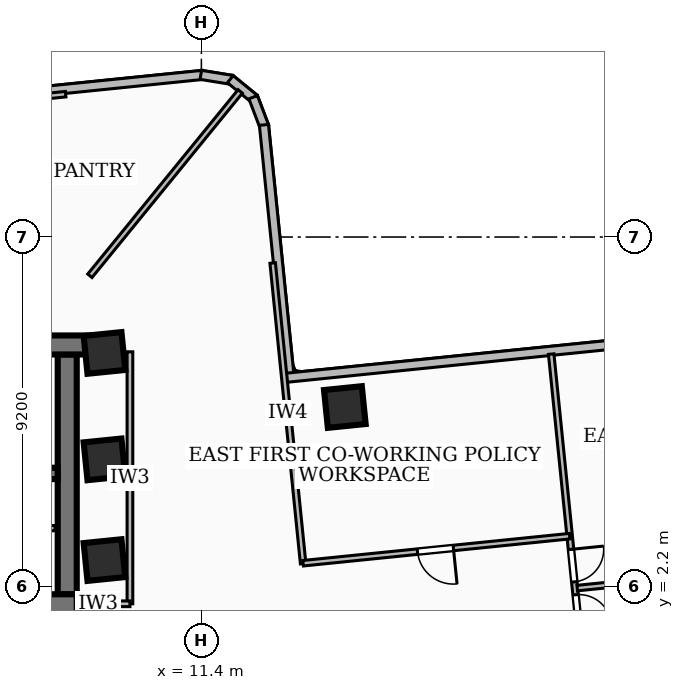
"""IFC4 building model, lengths in metres.
Left out: names, types, materials, properties, quantities, classifications, styles, units other than length and angle.
Written with IfcOpenShell. Run it as: python <this file> out.ifc"""

import sys

from ifc_helpers import new_model, si_unit, direction, frame, frame_2d, origin, origin_2d, place, context, subcontext, project, spatial, rectangle, extrude, element, fill, save


model = new_model("IFC4")
c1 = context("Model", 3, precision=1e-05, world=origin(), true_north=direction((0.0, 1.0)))
c2 = subcontext(c1, "Body", "Model", "MODEL_VIEW")
j1 = project(units=[si_unit("LENGTHUNIT", "METRE"), si_unit("PLANEANGLEUNIT", "RADIAN")], contexts=[c1])
p1 = place(None, origin())
s1 = spatial("IfcSite", under=j1, at=p1, CompositionType="ELEMENT")
p2 = place(p1, origin())
s2 = spatial("IfcBuilding", under=s1, at=p2, CompositionType="ELEMENT")
p3 = place(p2, frame((0.0, 0.0, 67.68)))
s3 = spatial("IfcBuildingStorey", under=s2, at=p3, CompositionType="ELEMENT", Elevation=67.68)
p4 = place(p3, frame((-8.78, 8.56, 0.0), z_axis=(0.0, 0.0, 1.0), x_axis=(1.0, 0.0, 0.0)))
e1 = element("IfcWall", 1, at=p4, inside=s3, PredefinedType="SHEAR", context=c2, shape_type="SweptSolid", body=[
    extrude(rectangle(XDim=17.56, YDim=0.5, at=frame_2d((8.78, 0.0))), origin(), (0.0, 0.0, 1.0), 3.34),
])
p5 = place(p3, frame((8.12, 1.75, 0.0), z_axis=(0.0, 0.0, 1.0), x_axis=(-1.0, 0.0, 0.0)))
e2 = element("IfcWall", 2, at=p5, inside=s3, PredefinedType="SHEAR", context=c2, shape_type="SweptSolid", body=[
    extrude(rectangle(XDim=16.24, YDim=0.5, at=frame_2d((8.12, 0.0))), origin(), (0.0, 0.0, 1.0), 3.34),
])
p6 = place(p5, frame((7.45, 0.0, 0.0)))
e3 = element("IfcOpeningElement", 3, at=p6, cuts=e2, PredefinedType="OPENING", context=c2, shape_type="SweptSolid", body=[
    extrude(rectangle(XDim=1.0, YDim=2.1, at=frame_2d((0.5, 1.05))), frame((0.0, 0.26, 0.0), z_axis=(0.0, -1.0, 0.0), x_axis=(1.0, 0.0, 0.0)), (0.0, 0.0, 1.0), 0.52),
])
p7 = place(p5, frame((3.4, 0.0, 0.0)))
e4 = element("IfcOpeningElement", 4, at=p7, cuts=e2, PredefinedType="OPENING", context=c2, shape_type="SweptSolid", body=[
    extrude(rectangle(XDim=0.9, YDim=2.06, at=frame_2d((0.45, 1.03))), frame((0.0, 0.26, 0.0), z_axis=(0.0, -1.0, 0.0), x_axis=(1.0, 0.0, 0.0)), (0.0, 0.0, 1.0), 0.52),
])
p8 = place(p5, frame((1.1, 0.0, 0.0)))
e5 = element("IfcOpeningElement", 5, at=p8, cuts=e2, PredefinedType="OPENING", context=c2, shape_type="SweptSolid", body=[
    extrude(rectangle(XDim=0.9, YDim=2.06, at=frame_2d((0.45, 1.03))), frame((0.0, 0.26, 0.0), z_axis=(0.0, -1.0, 0.0), x_axis=(1.0, 0.0, 0.0)), (0.0, 0.0, 1.0), 0.52),
])
p9 = place(p3, frame((7.87, 8.31, 0.0), z_axis=(0.0, 0.0, 1.0), x_axis=(0.0, -1.0, 0.0)))
e6 = element("IfcWall", 6, at=p9, inside=s3, PredefinedType="SHEAR", context=c2, shape_type="SweptSolid", body=[
    extrude(rectangle(XDim=6.31, YDim=0.5, at=frame_2d((3.155, 0.0))), origin(), (0.0, 0.0, 1.0), 3.34),
])
p10 = place(p3, frame((7.62, 5.18, 0.0), z_axis=(0.0, 0.0, 1.0), x_axis=(-1.0, 0.0, 0.0)))
e7 = element("IfcWall", 7, at=p10, inside=s3, PredefinedType="SOLIDWALL", context=c2, shape_type="SweptSolid", body=[
    extrude(rectangle(XDim=15.24, YDim=0.3, at=frame_2d((7.62, 0.0))), origin(), (0.0, 0.0, 1.0), 3.34),
])
p11 = place(p10, frame((5.77, 0.0, 0.0)))
e8 = element("IfcOpeningElement", 8, at=p11, cuts=e7, PredefinedType="OPENING", context=c2, shape_type="SweptSolid", body=[
    extrude(rectangle(XDim=1.1, YDim=2.15, at=frame_2d((0.55, 1.075))), frame((0.0, 0.16, 0.0), z_axis=(0.0, -1.0, 0.0), x_axis=(1.0, 0.0, 0.0)), (0.0, 0.0, 1.0), 0.32),
])
p12 = place(p10, frame((2.97, 0.0, 0.0)))
e9 = element("IfcOpeningElement", 9, at=p12, cuts=e7, PredefinedType="OPENING", context=c2, shape_type="SweptSolid", body=[
    extrude(rectangle(XDim=1.1, YDim=2.15, at=frame_2d((0.55, 1.075))), frame((0.0, 0.16, 0.0), z_axis=(0.0, -1.0, 0.0), x_axis=(1.0, 0.0, 0.0)), (0.0, 0.0, 1.0), 0.32),
])
p13 = place(p10, frame((7.97, 0.0, 0.0)))
e10 = element("IfcOpeningElement", 10, at=p13, cuts=e7, PredefinedType="OPENING", context=c2, shape_type="SweptSolid", body=[
    extrude(rectangle(XDim=1.0, YDim=2.1, at=frame_2d((0.5, 1.05))), frame((0.0, 0.16, 0.0), z_axis=(0.0, -1.0, 0.0), x_axis=(1.0, 0.0, 0.0)), (0.0, 0.0, 1.0), 0.32),
])
for number, where, z_axis, x_axis in (
    (11, (8.85, 2.9, 0.0), (0.0, 0.0, 1.0), (0.995, 0.101, 0.0)),
    (12, (8.85, 5.55, 0.0), (0.0, 0.0, 1.0), (0.995, 0.101, 0.0)),
    (13, (8.85, 8.35, 0.0), (0.0, 0.0, 1.0), (0.995, 0.101, 0.0)),
    (14, (15.175, 6.927, 0.0), (0.0, 0.0, 1.0), (0.995, 0.101, 0.0)),
):
    element("IfcColumn", number, at=place(p3, frame(where, z_axis=z_axis, x_axis=x_axis)), inside=s3, PredefinedType="COLUMN", context=c2, shape_type="SweptSolid", body=[
        extrude(rectangle(XDim=1.0, YDim=1.0, at=origin_2d()), origin(), (0.0, 0.0, 1.0), 3.6),
    ])
p14 = place(p3, frame((4.694, 14.981, 0.0), z_axis=(0.0, 0.0, 1.0), x_axis=(0.994875719665, 0.101105402534, 0.0)))
e15 = element("IfcWall", 15, at=p14, inside=s3, PredefinedType="SOLIDWALL", context=c2, shape_type="SweptSolid", body=[
    extrude(rectangle(XDim=6.776, YDim=0.24, at=frame_2d((3.388, 0.0))), origin(), (0.0, 0.0, 1.0), 2.486),
])
p15 = place(p3, frame((11.385, 15.667, 0.0), z_axis=(0.0, 0.0, 1.0), x_axis=(0.987091669755, -0.160156284613, 0.0)))
e16 = element("IfcWall", 16, at=p15, inside=s3, PredefinedType="SOLIDWALL", context=c2, shape_type="SweptSolid", body=[
    extrude(rectangle(XDim=0.831, YDim=0.24, at=frame_2d((0.416, 0.0))), origin(), (0.0, 0.0, 1.0), 3.34),
])
p16 = place(p3, frame((12.161, 15.554, 0.0), z_axis=(0.0, 0.0, 1.0), x_axis=(0.774946287969, -0.632027096542, 0.0)))
e17 = element("IfcWall", 17, at=p16, inside=s3, PredefinedType="SOLIDWALL", context=c2, shape_type="SweptSolid", body=[
    extrude(rectangle(XDim=0.813, YDim=0.24, at=frame_2d((0.407, 0.0))), origin(), (0.0, 0.0, 1.0), 3.34),
])
p17 = place(p3, frame((12.763, 15.079, 0.0), z_axis=(0.0, 0.0, 1.0), x_axis=(0.355469529522, -0.934687869602, 0.0)))
e18 = element("IfcWall", 18, at=p17, inside=s3, PredefinedType="SOLIDWALL", context=c2, shape_type="SweptSolid", body=[
    extrude(rectangle(XDim=0.83, YDim=0.24, at=frame_2d((0.415, 0.0))), origin(), (0.0, 0.0, 1.0), 3.34),
])
p18 = place(p3, frame((13.046, 14.351, 0.0), z_axis=(0.0, 0.0, 1.0), x_axis=(0.101248053545, -0.994861212257, 0.0)))
e19 = element("IfcWall", 19, at=p18, inside=s3, PredefinedType="SOLIDWALL", context=c2, shape_type="SweptSolid", body=[
    extrude(rectangle(XDim=6.776, YDim=0.24, at=frame_2d((3.388, 0.0))), origin(), (0.0, 0.0, 1.0), 3.34),
])
p19 = place(p3, frame((13.626, 7.696, 0.0), z_axis=(0.0, 0.0, 1.0), x_axis=(0.994872930989, 0.101132839298, 0.0)))
e20 = element("IfcWall", 20, at=p19, inside=s3, PredefinedType="SOLIDWALL", context=c2, shape_type="SweptSolid", body=[
    extrude(rectangle(XDim=16.276, YDim=0.24, at=frame_2d((8.138, 0.0))), origin(), (0.0, 0.0, 1.0), 3.34),
])
p20 = place(p19, frame((13.675, 0.0, 0.85)))
e21 = element("IfcOpeningElement", 21, at=p20, cuts=e20, PredefinedType="OPENING", context=c2, shape_type="SweptSolid", body=[
    extrude(rectangle(XDim=1.5, YDim=1.8, at=frame_2d((0.75, 0.9))), frame((0.0, 0.13, 0.0), z_axis=(0.0, -1.0, 0.0), x_axis=(1.0, 0.0, 0.0)), (0.0, 0.0, 1.0), 0.26),
])
p21 = place(p3, frame((2.9, 3.74, 0.0), z_axis=(0.0, 0.0, 1.0), x_axis=(1.0, 0.0, 0.0)))
e22 = element("IfcWall", 22, at=p21, inside=s3, PredefinedType="PARTITIONING", context=c2, shape_type="SweptSolid", body=[
    extrude(rectangle(XDim=4.65, YDim=0.138, at=frame_2d((2.325, 0.0))), origin(), (0.0, 0.0, 1.0), 3.34),
])
p22 = place(p3, frame((9.52, 1.75, 0.0), z_axis=(0.0, 0.0, 1.0), x_axis=(0.0, 1.0, 0.0)))
e23 = element("IfcWall", 23, at=p22, inside=s3, PredefinedType="PARTITIONING", context=c2, shape_type="SweptSolid", body=[
    extrude(rectangle(XDim=6.63, YDim=0.15, at=frame_2d((3.315, 0.0))), origin(), (0.0, 0.0, 1.0), 2.486),
])
p23 = place(p3, frame((7.85, 1.75, 0.0), z_axis=(0.0, 0.0, 1.0), x_axis=(1.0, 0.0, 0.0)))
e24 = element("IfcWall", 24, at=p23, inside=s3, PredefinedType="PARTITIONING", context=c2, shape_type="SweptSolid", body=[
    extrude(rectangle(XDim=1.67, YDim=0.15, at=frame_2d((0.835, 0.0))), origin(), (0.0, 0.0, 1.0), 2.405),
])
p24 = place(p3, frame((8.466, 10.38, 0.0), z_axis=(0.0, 0.0, 1.0), x_axis=(0.631992375104, 0.774974604623, 0.0)))
e25 = element("IfcWall", 25, at=p24, inside=s3, PredefinedType="PARTITIONING", context=c2, shape_type="SweptSolid", body=[
    extrude(rectangle(XDim=6.26, YDim=0.145, at=frame_2d((3.13, 0.0))), origin(), (0.0, 0.0, 1.0), 3.34),
])
p25 = place(p3, frame((14.078, 2.807, 0.0), z_axis=(0.0, 0.0, 1.0), x_axis=(-0.100884076592, 0.994898187299, 0.0)))
e26 = element("IfcWall", 26, at=p25, inside=s3, PredefinedType="PARTITIONING", context=c2, shape_type="SweptSolid", body=[
    extrude(rectangle(XDim=7.95, YDim=0.145, at=frame_2d((3.975, 0.0))), origin(), (0.0, 0.0, 1.0), 2.486),
])
p26 = place(p3, frame((21.091, 3.529, 0.0), z_axis=(0.0, 0.0, 1.0), x_axis=(-0.994885188523, -0.101012185692, 0.0)))
e27 = element("IfcWall", 27, at=p26, inside=s3, PredefinedType="PARTITIONING", context=c2, shape_type="SweptSolid", body=[
    extrude(rectangle(XDim=7.05, YDim=0.145, at=frame_2d((3.525, 0.0))), origin(), (0.0, 0.0, 1.0), 3.34),
])
p27 = place(p26, frame((3.075, 0.0, 0.0)))
e28 = element("IfcOpeningElement", 28, at=p27, cuts=e27, PredefinedType="OPENING", context=c2, shape_type="SweptSolid", body=[
    extrude(rectangle(XDim=0.95, YDim=2.08, at=frame_2d((0.475, 1.04))), frame((0.0, 0.083, 0.0), z_axis=(0.0, -1.0, 0.0), x_axis=(1.0, 0.0, 0.0)), (0.0, 0.0, 1.0), 0.165),
])
p28 = place(p3, frame((21.29, 2.163, 0.0), z_axis=(0.0, 0.0, 1.0), x_axis=(0.994879916843, 0.101064093832, 0.0)))
e29 = element("IfcWall", 29, at=p28, inside=s3, PredefinedType="PARTITIONING", context=c2, shape_type="SweptSolid", body=[
    extrude(rectangle(XDim=10.595, YDim=0.145, at=frame_2d((5.298, 0.0))), origin(), (0.0, 0.0, 1.0), 2.793),
])
p29 = place(p3, frame((20.605, 8.32, 0.0), z_axis=(0.0, 0.0, 1.0), x_axis=(0.101040883761, -0.994882274346, 0.0)))
e30 = element("IfcWall", 30, at=p29, inside=s3, PredefinedType="PARTITIONING", context=c2, shape_type="SweptSolid", body=[
    extrude(rectangle(XDim=12.391, YDim=0.145, at=frame_2d((6.195, 0.0))), origin(), (0.0, 0.0, 1.0), 2.486),
])
p30 = place(p29, frame((6.365, 0.0, 0.0)))
e31 = element("IfcOpeningElement", 31, at=p30, cuts=e30, PredefinedType="OPENING", context=c2, shape_type="SweptSolid", body=[
    extrude(rectangle(XDim=0.86, YDim=2.04, at=frame_2d((0.43, 1.02))), frame((0.0, 0.083, 0.0), z_axis=(0.0, -1.0, 0.0), x_axis=(1.0, 0.0, 0.0)), (0.0, 0.0, 1.0), 0.165),
])
p31 = place(p29, frame((5.165, 0.0, 0.0)))
e32 = element("IfcOpeningElement", 32, at=p31, cuts=e30, PredefinedType="OPENING", context=c2, shape_type="SweptSolid", body=[
    extrude(rectangle(XDim=0.86, YDim=2.04, at=frame_2d((0.43, 1.02))), frame((0.0, 0.083, 0.0), z_axis=(0.0, -1.0, 0.0), x_axis=(1.0, 0.0, 0.0)), (0.0, 0.0, 1.0), 0.165),
])
p32 = place(p3, frame((7.828, 15.159, 0.0), z_axis=(0.0, 0.0, 1.0), x_axis=(-0.994873184944, -0.101130341041, 0.0)))
e33 = element("IfcWall", 33, at=p32, inside=s3, PredefinedType="PARTITIONING", context=c2, shape_type="SweptSolid", body=[
    extrude(rectangle(XDim=7.95, YDim=0.145, at=frame_2d((3.975, 0.0))), origin(), (0.0, 0.0, 1.0), 2.486),
])
p33 = place(p27, origin())
e34 = element("IfcDoor", 34, at=p33, inside=s3, OperationType="SINGLE_SWING_LEFT", PredefinedType="DOOR", context=c2, shape_type="SweptSolid", body=[
    extrude(rectangle(XDim=0.95, YDim=2.08, at=frame_2d((0.475, 1.04))), frame((0.0, 0.025, 0.0), z_axis=(0.0, -1.0, 0.0), x_axis=(1.0, 0.0, 0.0)), (0.0, 0.0, 1.0), 0.05),
])
fill(e28, e34)
p34 = place(p30, origin())
e35 = element("IfcDoor", 35, at=p34, inside=s3, OperationType="SINGLE_SWING_RIGHT", PredefinedType="DOOR", context=c2, shape_type="SweptSolid", body=[
    extrude(rectangle(XDim=0.86, YDim=2.04, at=frame_2d((0.43, 1.02))), frame((0.0, 0.025, 0.0), z_axis=(0.0, -1.0, 0.0), x_axis=(1.0, 0.0, 0.0)), (0.0, 0.0, 1.0), 0.05),
])
fill(e31, e35)
p35 = place(p31, origin())
e36 = element("IfcDoor", 36, at=p35, inside=s3, OperationType="SINGLE_SWING_LEFT", PredefinedType="DOOR", context=c2, shape_type="SweptSolid", body=[
    extrude(rectangle(XDim=0.86, YDim=2.04, at=frame_2d((0.43, 1.02))), frame((0.0, 0.025, 0.0), z_axis=(0.0, -1.0, 0.0), x_axis=(1.0, 0.0, 0.0)), (0.0, 0.0, 1.0), 0.05),
])
fill(e32, e36)
save(model, sys.argv[1])
